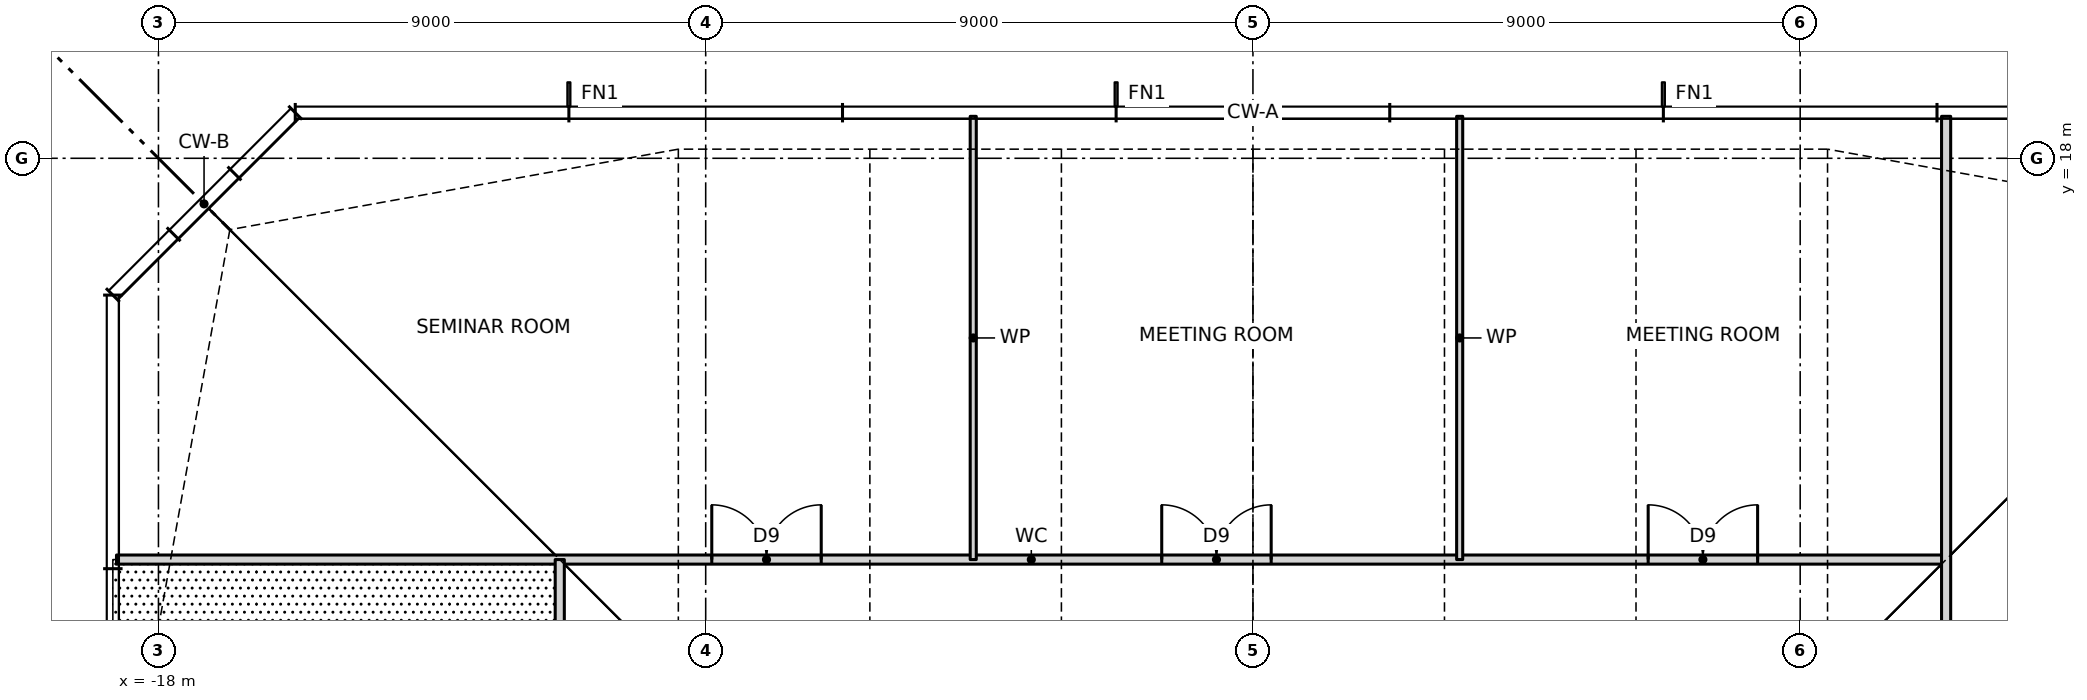
"""IFC4 building model, lengths in metres.
Left out: names, types, materials, properties, quantities, classifications, styles, units other than length and angle.
Written with IfcOpenShell. Run it as: python <this file> out.ifc"""

import sys

from ifc_helpers import new_model, si_unit, direction, frame, frame_2d, origin, place, context, subcontext, project, spatial, rectangle, extrude, element, fill, save


model = new_model("IFC4")
c1 = context("Model", 3, precision=1e-05, world=origin(), true_north=direction((0.0, 1.0)))
c2 = subcontext(c1, "Body", "Model", "MODEL_VIEW")
j1 = project(units=[si_unit("LENGTHUNIT", "METRE"), si_unit("PLANEANGLEUNIT", "RADIAN")], contexts=[c1])
p1 = place(None, origin())
s1 = spatial("IfcSite", under=j1, at=p1, CompositionType="ELEMENT")
p2 = place(p1, origin())
s2 = spatial("IfcBuilding", under=s1, at=p2, CompositionType="ELEMENT")
p3 = place(p2, frame((0.0, 0.0, 149.5)))
s3 = spatial("IfcBuildingStorey", under=s2, at=p3, CompositionType="ELEMENT", Elevation=149.5)
p4 = place(p3, frame((-18.69, 11.4, 0.0), z_axis=(0.0, 0.0, 1.0), x_axis=(1.0, 0.0, 0.0)))
e1 = element("IfcWall", 1, at=p4, inside=s3, PredefinedType="PARTITIONING", context=c2, shape_type="SweptSolid", body=[
    extrude(rectangle(XDim=30.09, YDim=0.15, at=frame_2d((15.045, 0.0))), origin(), (0.0, 0.0, 1.0), 3.27),
])
p5 = place(p4, frame((25.19, 0.0, 0.0)))
e2 = element("IfcOpeningElement", 2, at=p5, cuts=e1, PredefinedType="OPENING", context=c2, shape_type="SweptSolid", body=[
    extrude(rectangle(XDim=1.8, YDim=2.1, at=frame_2d((0.9, 1.05))), frame((0.0, 0.085, 0.0), z_axis=(0.0, -1.0, 0.0), x_axis=(1.0, 0.0, 0.0)), (0.0, 0.0, 1.0), 0.17),
])
p6 = place(p4, frame((17.19, 0.0, 0.0)))
e3 = element("IfcOpeningElement", 3, at=p6, cuts=e1, PredefinedType="OPENING", context=c2, shape_type="SweptSolid", body=[
    extrude(rectangle(XDim=1.8, YDim=2.1, at=frame_2d((0.9, 1.05))), frame((0.0, 0.085, 0.0), z_axis=(0.0, -1.0, 0.0), x_axis=(1.0, 0.0, 0.0)), (0.0, 0.0, 1.0), 0.17),
])
p7 = place(p4, frame((9.79, 0.0, 0.0)))
e4 = element("IfcOpeningElement", 4, at=p7, cuts=e1, PredefinedType="OPENING", context=c2, shape_type="SweptSolid", body=[
    extrude(rectangle(XDim=1.8, YDim=2.1, at=frame_2d((0.9, 1.05))), frame((0.0, 0.085, 0.0), z_axis=(0.0, -1.0, 0.0), x_axis=(1.0, 0.0, 0.0)), (0.0, 0.0, 1.0), 0.17),
])
p8 = place(p3, frame((11.4, -11.4, 0.0), z_axis=(0.0, 0.0, 1.0), x_axis=(0.0, 1.0, 0.0)))
e5 = element("IfcWall", 5, at=p8, inside=s3, PredefinedType="PARTITIONING", context=c2, shape_type="SweptSolid", body=[
    extrude(rectangle(XDim=30.09, YDim=0.15, at=frame_2d((15.045, 0.0))), origin(), (0.0, 0.0, 1.0), 3.27),
])
p9 = place(p8, frame((1.35, 0.0, 0.0)))
e6 = element("IfcOpeningElement", 6, at=p9, cuts=e5, PredefinedType="OPENING", context=c2, shape_type="SweptSolid", body=[
    extrude(rectangle(XDim=0.9, YDim=2.1, at=frame_2d((0.45, 1.05))), frame((0.0, 0.085, 0.0), z_axis=(0.0, -1.0, 0.0), x_axis=(1.0, 0.0, 0.0)), (0.0, 0.0, 1.0), 0.17),
])
p10 = place(p8, frame((4.65, 0.0, 0.0)))
e7 = element("IfcOpeningElement", 7, at=p10, cuts=e5, PredefinedType="OPENING", context=c2, shape_type="SweptSolid", body=[
    extrude(rectangle(XDim=0.9, YDim=2.1, at=frame_2d((0.45, 1.05))), frame((0.0, 0.085, 0.0), z_axis=(0.0, -1.0, 0.0), x_axis=(1.0, 0.0, 0.0)), (0.0, 0.0, 1.0), 0.17),
])
p11 = place(p8, frame((7.35, 0.0, 0.0)))
e8 = element("IfcOpeningElement", 8, at=p11, cuts=e5, PredefinedType="OPENING", context=c2, shape_type="SweptSolid", body=[
    extrude(rectangle(XDim=0.9, YDim=2.1, at=frame_2d((0.45, 1.05))), frame((0.0, 0.085, 0.0), z_axis=(0.0, -1.0, 0.0), x_axis=(1.0, 0.0, 0.0)), (0.0, 0.0, 1.0), 0.17),
])
p12 = place(p8, frame((15.0, 0.0, 0.0)))
e9 = element("IfcOpeningElement", 9, at=p12, cuts=e5, PredefinedType="OPENING", context=c2, shape_type="SweptSolid", body=[
    extrude(rectangle(XDim=1.8, YDim=2.1, at=frame_2d((0.9, 1.05))), frame((0.0, 0.085, 0.0), z_axis=(0.0, -1.0, 0.0), x_axis=(1.0, 0.0, 0.0)), (0.0, 0.0, 1.0), 0.17),
])
for number, where, z_axis, x_axis in (
    (10, (3.4, 11.4, 0.0), (0.0, 0.0, 1.0), (0.0, 1.0, 0.0)),
    (11, (-4.6, 11.4, 0.0), (0.0, 0.0, 1.0), (0.0, 1.0, 0.0)),
):
    element("IfcWall", number, at=place(p3, frame(where, z_axis=z_axis, x_axis=x_axis)), inside=s3, PredefinedType="PARTITIONING", context=c2, shape_type="SweptSolid", body=[
        extrude(rectangle(XDim=7.29, YDim=0.1, at=frame_2d((3.645, 0.0))), origin(), (0.0, 0.0, 1.0), 3.27),
    ])
p13 = place(p3, frame((-11.4, -18.69, 0.0), z_axis=(0.0, 0.0, 1.0), x_axis=(0.0, 1.0, 0.0)))
e12 = element("IfcWall", 12, at=p13, inside=s3, PredefinedType="PARTITIONING", context=c2, shape_type="SweptSolid", body=[
    extrude(rectangle(XDim=30.09, YDim=0.15, at=frame_2d((15.045, 0.0))), origin(), (0.0, 0.0, 1.0), 3.27),
])
p14 = place(p13, frame((20.69, 0.0, 0.0)))
e13 = element("IfcOpeningElement", 13, at=p14, cuts=e12, PredefinedType="OPENING", context=c2, shape_type="SweptSolid", body=[
    extrude(rectangle(XDim=1.8, YDim=2.1, at=frame_2d((0.9, 1.05))), frame((0.0, 0.085, 0.0), z_axis=(0.0, -1.0, 0.0), x_axis=(1.0, 0.0, 0.0)), (0.0, 0.0, 1.0), 0.17),
])
p15 = place(p13, frame((9.29, 0.0, 0.0)))
e14 = element("IfcOpeningElement", 14, at=p15, cuts=e12, PredefinedType="OPENING", context=c2, shape_type="SweptSolid", body=[
    extrude(rectangle(XDim=1.8, YDim=2.1, at=frame_2d((0.9, 1.05))), frame((0.0, 0.085, 0.0), z_axis=(0.0, -1.0, 0.0), x_axis=(1.0, 0.0, 0.0)), (0.0, 0.0, 1.0), 0.17),
])
p16 = place(p5, origin())
e15 = element("IfcDoor", 15, at=p16, inside=s3, OperationType="DOUBLE_DOOR_SINGLE_SWING", PredefinedType="DOOR", context=c2, shape_type="SweptSolid", body=[
    extrude(rectangle(XDim=1.8, YDim=2.1, at=frame_2d((0.9, 1.05))), frame((0.0, 0.025, 0.0), z_axis=(0.0, -1.0, 0.0), x_axis=(1.0, 0.0, 0.0)), (0.0, 0.0, 1.0), 0.05),
])
fill(e2, e15)
p17 = place(p6, origin())
e16 = element("IfcDoor", 16, at=p17, inside=s3, OperationType="DOUBLE_DOOR_SINGLE_SWING", PredefinedType="DOOR", context=c2, shape_type="SweptSolid", body=[
    extrude(rectangle(XDim=1.8, YDim=2.1, at=frame_2d((0.9, 1.05))), frame((0.0, 0.025, 0.0), z_axis=(0.0, -1.0, 0.0), x_axis=(1.0, 0.0, 0.0)), (0.0, 0.0, 1.0), 0.05),
])
fill(e3, e16)
p18 = place(p7, origin())
e17 = element("IfcDoor", 17, at=p18, inside=s3, OperationType="DOUBLE_DOOR_SINGLE_SWING", PredefinedType="DOOR", context=c2, shape_type="SweptSolid", body=[
    extrude(rectangle(XDim=1.8, YDim=2.1, at=frame_2d((0.9, 1.05))), frame((0.0, 0.025, 0.0), z_axis=(0.0, -1.0, 0.0), x_axis=(1.0, 0.0, 0.0)), (0.0, 0.0, 1.0), 0.05),
])
fill(e4, e17)
save(model, sys.argv[1])
